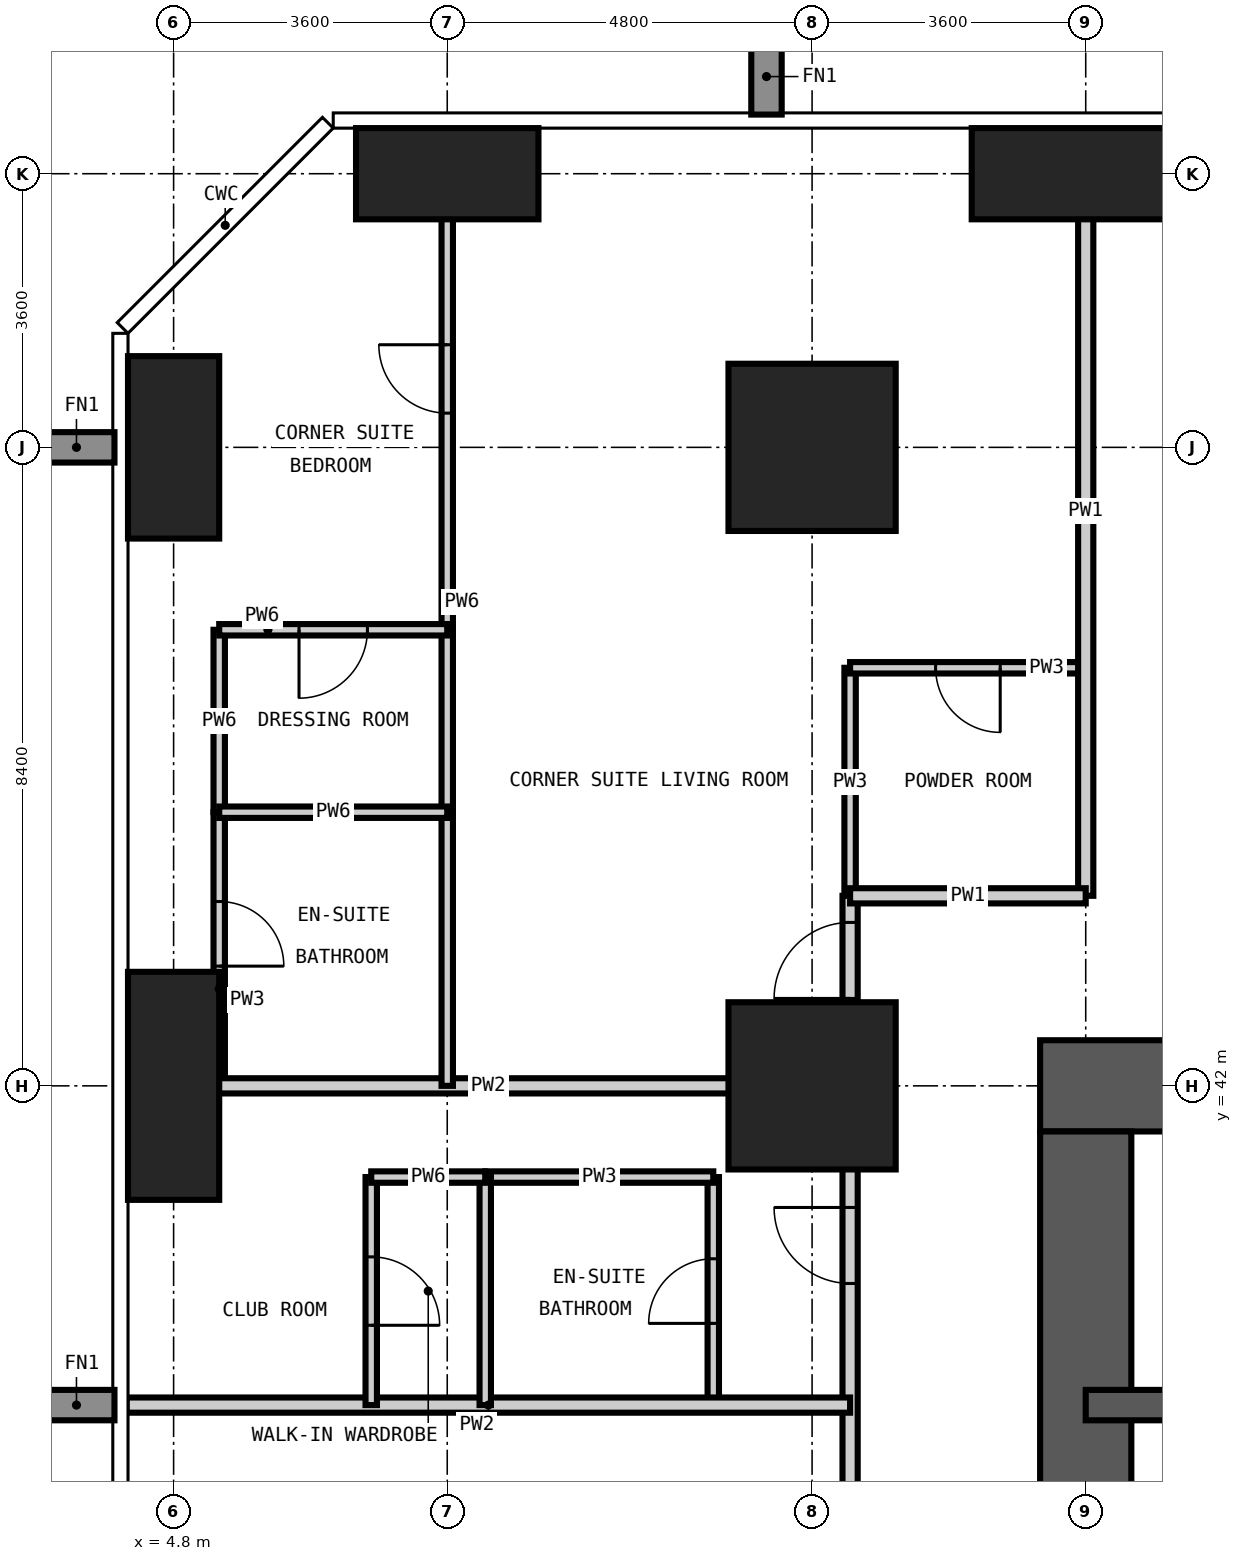
"""IFC4 building model, lengths in metres.
Left out: names, types, materials, properties, quantities, classifications, styles, units other than length and angle.
Written with IfcOpenShell. Run it as: python <this file> out.ifc"""

import sys

from ifc_helpers import new_model, si_unit, direction, frame, frame_2d, origin, origin_2d, place, context, subcontext, project, spatial, rectangle, extrude, element, fill, save


model = new_model("IFC4")
c1 = context("Model", 3, precision=1e-05, world=origin(), true_north=direction((0.0, 1.0)))
c2 = subcontext(c1, "Body", "Model", "MODEL_VIEW")
j1 = project(units=[si_unit("LENGTHUNIT", "METRE"), si_unit("PLANEANGLEUNIT", "RADIAN")], contexts=[c1])
p1 = place(None, origin())
s1 = spatial("IfcSite", under=j1, at=p1, CompositionType="ELEMENT")
p2 = place(p1, origin())
s2 = spatial("IfcBuilding", under=s1, at=p2, CompositionType="ELEMENT")
p3 = place(p2, frame((0.0, 0.0, 162.6)))
s3 = spatial("IfcBuildingStorey", under=s2, at=p3, CompositionType="ELEMENT", Elevation=162.6)
p4 = place(p3, frame((4.8, 42.0, -0.35), z_axis=(0.0, 0.0, 1.0), x_axis=(1.0, 0.0, 0.0)))
e1 = element("IfcColumn", 1, at=p4, inside=s3, PredefinedType="COLUMN", context=c2, shape_type="SweptSolid", body=[
    extrude(rectangle(XDim=1.2, YDim=3.0, at=origin_2d()), origin(), (0.0, 0.0, 1.0), 3.6),
])
p5 = place(p3, frame((4.8, 50.4, -0.35), z_axis=(0.0, 0.0, 1.0), x_axis=(1.0, 0.0, 0.0)))
e2 = element("IfcColumn", 2, at=p5, inside=s3, PredefinedType="COLUMN", context=c2, shape_type="SweptSolid", body=[
    extrude(rectangle(XDim=1.2, YDim=2.4, at=origin_2d()), origin(), (0.0, 0.0, 1.0), 3.6),
])
p6 = place(p3, frame((8.4, 54.0, -0.35), z_axis=(0.0, 0.0, 1.0), x_axis=(1.0, 0.0, 0.0)))
e3 = element("IfcColumn", 3, at=p6, inside=s3, PredefinedType="COLUMN", context=c2, shape_type="SweptSolid", body=[
    extrude(rectangle(XDim=2.4, YDim=1.2, at=origin_2d()), origin(), (0.0, 0.0, 1.0), 3.6),
])
for number, where, z_axis, x_axis in (
    (4, (13.2, 42.0, -0.35), (0.0, 0.0, 1.0), (1.0, 0.0, 0.0)),
    (5, (13.2, 50.4, -0.35), (0.0, 0.0, 1.0), (1.0, 0.0, 0.0)),
):
    element("IfcColumn", number, at=place(p3, frame(where, z_axis=z_axis, x_axis=x_axis)), inside=s3, PredefinedType="COLUMN", context=c2, shape_type="SweptSolid", body=[
        extrude(rectangle(XDim=2.2, YDim=2.2, at=origin_2d()), origin(), (0.0, 0.0, 1.0), 3.6),
    ])
p7 = place(p3, frame((16.8, 54.0, -0.35), z_axis=(0.0, 0.0, 1.0), x_axis=(1.0, 0.0, 0.0)))
e6 = element("IfcColumn", 6, at=p7, inside=s3, PredefinedType="COLUMN", context=c2, shape_type="SweptSolid", body=[
    extrude(rectangle(XDim=3.0, YDim=1.2, at=origin_2d()), origin(), (0.0, 0.0, 1.0), 3.6),
])
p8 = place(p3, frame((42.6, 42.0, -0.35), z_axis=(0.0, 0.0, 1.0), x_axis=(-1.0, 0.0, 0.0)))
e7 = element("IfcWall", 7, at=p8, inside=s3, PredefinedType="SHEAR", context=c2, shape_type="SweptSolid", body=[
    extrude(rectangle(XDim=26.4, YDim=1.2, at=frame_2d((13.2, 0.0))), origin(), (0.0, 0.0, 1.0), 3.6),
])
p9 = place(p8, frame((21.1, 0.0, 0.35)))
e8 = element("IfcOpeningElement", 8, at=p9, cuts=e7, PredefinedType="OPENING", context=c2, shape_type="SweptSolid", body=[
    extrude(rectangle(XDim=1.0, YDim=2.1, at=frame_2d((0.5, 1.05))), frame((0.0, 0.61, 0.0), z_axis=(0.0, -1.0, 0.0), x_axis=(1.0, 0.0, 0.0)), (0.0, 0.0, 1.0), 1.22),
])
p10 = place(p8, frame((10.5, 0.0, 0.35)))
e9 = element("IfcOpeningElement", 9, at=p10, cuts=e7, PredefinedType="OPENING", context=c2, shape_type="SweptSolid", body=[
    extrude(rectangle(XDim=1.2, YDim=2.2, at=frame_2d((0.6, 1.1))), frame((0.0, 0.61, 0.0), z_axis=(0.0, -1.0, 0.0), x_axis=(1.0, 0.0, 0.0)), (0.0, 0.0, 1.0), 1.22),
])
p11 = place(p3, frame((16.8, 41.4, -0.35), z_axis=(0.0, 0.0, 1.0), x_axis=(0.0, -1.0, 0.0)))
e10 = element("IfcWall", 10, at=p11, inside=s3, PredefinedType="SHEAR", context=c2, shape_type="SweptSolid", body=[
    extrude(rectangle(XDim=24.0, YDim=1.2, at=frame_2d((12.0, 0.0))), origin(), (0.0, 0.0, 1.0), 3.6),
])
p12 = place(p11, frame((11.1, 0.0, 0.35)))
e11 = element("IfcOpeningElement", 11, at=p12, cuts=e10, PredefinedType="OPENING", context=c2, shape_type="SweptSolid", body=[
    extrude(rectangle(XDim=1.8, YDim=2.2, at=frame_2d((0.9, 1.1))), frame((0.0, 0.61, 0.0), z_axis=(0.0, -1.0, 0.0), x_axis=(1.0, 0.0, 0.0)), (0.0, 0.0, 1.0), 1.22),
])
p13 = place(p11, frame((19.9, 0.0, 0.35)))
e12 = element("IfcOpeningElement", 12, at=p13, cuts=e10, PredefinedType="OPENING", context=c2, shape_type="SweptSolid", body=[
    extrude(rectangle(XDim=1.0, YDim=2.1, at=frame_2d((0.5, 1.05))), frame((0.0, 0.61, 0.0), z_axis=(0.0, -1.0, 0.0), x_axis=(1.0, 0.0, 0.0)), (0.0, 0.0, 1.0), 1.22),
])
p14 = place(p11, frame((5.2, 0.0, 0.35)))
e13 = element("IfcOpeningElement", 13, at=p14, cuts=e10, PredefinedType="OPENING", context=c2, shape_type="SweptSolid", body=[
    extrude(rectangle(XDim=1.0, YDim=2.1, at=frame_2d((0.5, 1.05))), frame((0.0, 0.61, 0.0), z_axis=(0.0, -1.0, 0.0), x_axis=(1.0, 0.0, 0.0)), (0.0, 0.0, 1.0), 1.22),
])
p15 = place(p3, frame((16.8, 37.8, -0.35), z_axis=(0.0, 0.0, 1.0), x_axis=(1.0, 0.0, 0.0)))
e14 = element("IfcWall", 14, at=p15, inside=s3, PredefinedType="SHEAR", context=c2, shape_type="SweptSolid", body=[
    extrude(rectangle(XDim=8.4, YDim=0.4, at=frame_2d((4.2, 0.0))), origin(), (0.0, 0.0, 1.0), 3.6),
])
p16 = place(p3, frame((5.4, 42.0, 0.0), z_axis=(0.0, 0.0, 1.0), x_axis=(0.0, 1.0, 0.0)))
e15 = element("IfcWall", 15, at=p16, inside=s3, PredefinedType="PARTITIONING", context=c2, shape_type="SweptSolid", body=[
    extrude(rectangle(XDim=3.6, YDim=0.15, at=frame_2d((1.8, 0.0))), origin(), (0.0, 0.0, 1.0), 3.25),
])
p17 = place(p16, frame((1.575, 0.0, 0.0)))
e16 = element("IfcOpeningElement", 16, at=p17, cuts=e15, PredefinedType="OPENING", context=c2, shape_type="SweptSolid", body=[
    extrude(rectangle(XDim=0.85, YDim=2.1, at=frame_2d((0.425, 1.05))), frame((0.0, 0.085, 0.0), z_axis=(0.0, -1.0, 0.0), x_axis=(1.0, 0.0, 0.0)), (0.0, 0.0, 1.0), 0.17),
])
p18 = place(p3, frame((11.9, 37.8, 0.0), z_axis=(0.0, 0.0, 1.0), x_axis=(0.0, 1.0, 0.0)))
e17 = element("IfcWall", 17, at=p18, inside=s3, PredefinedType="PARTITIONING", context=c2, shape_type="SweptSolid", body=[
    extrude(rectangle(XDim=3.0, YDim=0.15, at=frame_2d((1.5, 0.0))), origin(), (0.0, 0.0, 1.0), 3.25),
])
p19 = place(p18, frame((1.075, 0.0, 0.0)))
e18 = element("IfcOpeningElement", 18, at=p19, cuts=e17, PredefinedType="OPENING", context=c2, shape_type="SweptSolid", body=[
    extrude(rectangle(XDim=0.85, YDim=2.1, at=frame_2d((0.425, 1.05))), frame((0.0, 0.085, 0.0), z_axis=(0.0, -1.0, 0.0), x_axis=(1.0, 0.0, 0.0)), (0.0, 0.0, 1.0), 0.17),
])
for number, where, z_axis, x_axis in (
    (19, (13.7, 44.5, 0.0), (0.0, 0.0, 1.0), (0.0, 1.0, 0.0)),
    (20, (8.9, 40.8, 0.0), (0.0, 0.0, 1.0), (1.0, 0.0, 0.0)),
):
    element("IfcWall", number, at=place(p3, frame(where, z_axis=z_axis, x_axis=x_axis)), inside=s3, PredefinedType="PARTITIONING", context=c2, shape_type="SweptSolid", body=[
        extrude(rectangle(XDim=3.0, YDim=0.15, at=frame_2d((1.5, 0.0))), origin(), (0.0, 0.0, 1.0), 3.25),
    ])
p20 = place(p3, frame((13.7, 47.5, 0.0), z_axis=(0.0, 0.0, 1.0), x_axis=(1.0, 0.0, 0.0)))
e21 = element("IfcWall", 21, at=p20, inside=s3, PredefinedType="PARTITIONING", context=c2, shape_type="SweptSolid", body=[
    extrude(rectangle(XDim=3.1, YDim=0.15, at=frame_2d((1.55, 0.0))), origin(), (0.0, 0.0, 1.0), 3.25),
])
p21 = place(p20, frame((1.125, 0.0, 0.0)))
e22 = element("IfcOpeningElement", 22, at=p21, cuts=e21, PredefinedType="OPENING", context=c2, shape_type="SweptSolid", body=[
    extrude(rectangle(XDim=0.85, YDim=2.1, at=frame_2d((0.425, 1.05))), frame((0.0, 0.085, 0.0), z_axis=(0.0, -1.0, 0.0), x_axis=(1.0, 0.0, 0.0)), (0.0, 0.0, 1.0), 0.17),
])
p22 = place(p3, frame((13.7, 13.7, 0.0), z_axis=(0.0, 0.0, 1.0), x_axis=(0.0, 1.0, 0.0)))
e23 = element("IfcWall", 23, at=p22, inside=s3, PredefinedType="PARTITIONING", context=c2, shape_type="SweptSolid", body=[
    extrude(rectangle(XDim=30.8, YDim=0.2, at=frame_2d((15.4, 0.0))), origin(), (0.0, 0.0, 1.0), 3.25),
])
p23 = place(p22, frame((4.7, 0.0, 0.0)))
e24 = element("IfcOpeningElement", 24, at=p23, cuts=e23, PredefinedType="OPENING", context=c2, shape_type="SweptSolid", body=[
    extrude(rectangle(XDim=1.0, YDim=2.2, at=frame_2d((0.5, 1.1))), frame((0.0, 0.11, 0.0), z_axis=(0.0, -1.0, 0.0), x_axis=(1.0, 0.0, 0.0)), (0.0, 0.0, 1.0), 0.22),
])
p24 = place(p22, frame((8.9, 0.0, 0.0)))
e25 = element("IfcOpeningElement", 25, at=p24, cuts=e23, PredefinedType="OPENING", context=c2, shape_type="SweptSolid", body=[
    extrude(rectangle(XDim=1.0, YDim=2.2, at=frame_2d((0.5, 1.1))), frame((0.0, 0.11, 0.0), z_axis=(0.0, -1.0, 0.0), x_axis=(1.0, 0.0, 0.0)), (0.0, 0.0, 1.0), 0.22),
])
p25 = place(p22, frame((13.1, 0.0, 0.0)))
e26 = element("IfcOpeningElement", 26, at=p25, cuts=e23, PredefinedType="OPENING", context=c2, shape_type="SweptSolid", body=[
    extrude(rectangle(XDim=1.0, YDim=2.2, at=frame_2d((0.5, 1.1))), frame((0.0, 0.11, 0.0), z_axis=(0.0, -1.0, 0.0), x_axis=(1.0, 0.0, 0.0)), (0.0, 0.0, 1.0), 0.22),
])
p26 = place(p22, frame((17.3, 0.0, 0.0)))
e27 = element("IfcOpeningElement", 27, at=p26, cuts=e23, PredefinedType="OPENING", context=c2, shape_type="SweptSolid", body=[
    extrude(rectangle(XDim=1.0, YDim=2.2, at=frame_2d((0.5, 1.1))), frame((0.0, 0.11, 0.0), z_axis=(0.0, -1.0, 0.0), x_axis=(1.0, 0.0, 0.0)), (0.0, 0.0, 1.0), 0.22),
])
p27 = place(p22, frame((21.5, 0.0, 0.0)))
e28 = element("IfcOpeningElement", 28, at=p27, cuts=e23, PredefinedType="OPENING", context=c2, shape_type="SweptSolid", body=[
    extrude(rectangle(XDim=1.0, YDim=2.2, at=frame_2d((0.5, 1.1))), frame((0.0, 0.11, 0.0), z_axis=(0.0, -1.0, 0.0), x_axis=(1.0, 0.0, 0.0)), (0.0, 0.0, 1.0), 0.22),
])
p28 = place(p22, frame((25.7, 0.0, 0.0)))
e29 = element("IfcOpeningElement", 29, at=p28, cuts=e23, PredefinedType="OPENING", context=c2, shape_type="SweptSolid", body=[
    extrude(rectangle(XDim=1.0, YDim=2.2, at=frame_2d((0.5, 1.1))), frame((0.0, 0.11, 0.0), z_axis=(0.0, -1.0, 0.0), x_axis=(1.0, 0.0, 0.0)), (0.0, 0.0, 1.0), 0.22),
])
p29 = place(p22, frame((0.95, 0.0, 0.0)))
e30 = element("IfcOpeningElement", 30, at=p29, cuts=e23, PredefinedType="OPENING", context=c2, shape_type="SweptSolid", body=[
    extrude(rectangle(XDim=1.0, YDim=2.2, at=frame_2d((0.5, 1.1))), frame((0.0, 0.11, 0.0), z_axis=(0.0, -1.0, 0.0), x_axis=(1.0, 0.0, 0.0)), (0.0, 0.0, 1.0), 0.22),
])
p30 = place(p22, frame((29.45, 0.0, 0.0)))
e31 = element("IfcOpeningElement", 31, at=p30, cuts=e23, PredefinedType="OPENING", context=c2, shape_type="SweptSolid", body=[
    extrude(rectangle(XDim=1.0, YDim=2.2, at=frame_2d((0.5, 1.1))), frame((0.0, 0.11, 0.0), z_axis=(0.0, -1.0, 0.0), x_axis=(1.0, 0.0, 0.0)), (0.0, 0.0, 1.0), 0.22),
])
p31 = place(p3, frame((16.8, 44.5, 0.0), z_axis=(0.0, 0.0, 1.0), x_axis=(0.0, 1.0, 0.0)))
e32 = element("IfcWall", 32, at=p31, inside=s3, PredefinedType="PARTITIONING", context=c2, shape_type="SweptSolid", body=[
    extrude(rectangle(XDim=10.118, YDim=0.2, at=frame_2d((5.059, 0.0))), origin(), (0.0, 0.0, 1.0), 3.25),
])
p32 = place(p3, frame((13.7, 44.5, 0.0), z_axis=(0.0, 0.0, 1.0), x_axis=(1.0, 0.0, 0.0)))
e33 = element("IfcWall", 33, at=p32, inside=s3, PredefinedType="PARTITIONING", context=c2, shape_type="SweptSolid", body=[
    extrude(rectangle(XDim=3.1, YDim=0.2, at=frame_2d((1.55, 0.0))), origin(), (0.0, 0.0, 1.0), 3.25),
])
for number, where, z_axis, x_axis in (
    (34, (4.182, 37.8, 0.0), (0.0, 0.0, 1.0), (1.0, 0.0, 0.0)),
    (35, (4.182, 42.0, 0.0), (0.0, 0.0, 1.0), (1.0, 0.0, 0.0)),
):
    element("IfcWall", number, at=place(p3, frame(where, z_axis=z_axis, x_axis=x_axis)), inside=s3, PredefinedType="PARTITIONING", context=c2, shape_type="SweptSolid", body=[
        extrude(rectangle(XDim=9.518, YDim=0.2, at=frame_2d((4.759, 0.0))), origin(), (0.0, 0.0, 1.0), 3.25),
    ])
p33 = place(p3, frame((5.4, 45.6, 0.0), z_axis=(0.0, 0.0, 1.0), x_axis=(0.0, 1.0, 0.0)))
e36 = element("IfcWall", 36, at=p33, inside=s3, PredefinedType="PARTITIONING", context=c2, shape_type="SweptSolid", body=[
    extrude(rectangle(XDim=2.4, YDim=0.15, at=frame_2d((1.2, 0.0))), origin(), (0.0, 0.0, 1.0), 3.25),
])
p34 = place(p3, frame((7.4, 37.8, 0.0), z_axis=(0.0, 0.0, 1.0), x_axis=(0.0, 1.0, 0.0)))
e37 = element("IfcWall", 37, at=p34, inside=s3, PredefinedType="PARTITIONING", context=c2, shape_type="SweptSolid", body=[
    extrude(rectangle(XDim=3.0, YDim=0.15, at=frame_2d((1.5, 0.0))), origin(), (0.0, 0.0, 1.0), 3.25),
])
p35 = place(p34, frame((1.05, 0.0, 0.0)))
e38 = element("IfcOpeningElement", 38, at=p35, cuts=e37, PredefinedType="OPENING", context=c2, shape_type="SweptSolid", body=[
    extrude(rectangle(XDim=0.9, YDim=2.1, at=frame_2d((0.45, 1.05))), frame((0.0, 0.085, 0.0), z_axis=(0.0, -1.0, 0.0), x_axis=(1.0, 0.0, 0.0)), (0.0, 0.0, 1.0), 0.17),
])
p36 = place(p3, frame((8.4, 42.0, 0.0), z_axis=(0.0, 0.0, 1.0), x_axis=(0.0, 1.0, 0.0)))
e39 = element("IfcWall", 39, at=p36, inside=s3, PredefinedType="PARTITIONING", context=c2, shape_type="SweptSolid", body=[
    extrude(rectangle(XDim=12.618, YDim=0.15, at=frame_2d((6.309, 0.0))), origin(), (0.0, 0.0, 1.0), 3.25),
])
p37 = place(p36, frame((8.85, 0.0, 0.0)))
e40 = element("IfcOpeningElement", 40, at=p37, cuts=e39, PredefinedType="OPENING", context=c2, shape_type="SweptSolid", body=[
    extrude(rectangle(XDim=0.9, YDim=2.1, at=frame_2d((0.45, 1.05))), frame((0.0, 0.085, 0.0), z_axis=(0.0, -1.0, 0.0), x_axis=(1.0, 0.0, 0.0)), (0.0, 0.0, 1.0), 0.17),
])
p38 = place(p3, frame((8.9, 37.8, 0.0), z_axis=(0.0, 0.0, 1.0), x_axis=(0.0, 1.0, 0.0)))
e41 = element("IfcWall", 41, at=p38, inside=s3, PredefinedType="PARTITIONING", context=c2, shape_type="SweptSolid", body=[
    extrude(rectangle(XDim=3.0, YDim=0.15, at=frame_2d((1.5, 0.0))), origin(), (0.0, 0.0, 1.0), 3.25),
])
p39 = place(p3, frame((7.4, 40.8, 0.0), z_axis=(0.0, 0.0, 1.0), x_axis=(1.0, 0.0, 0.0)))
e42 = element("IfcWall", 42, at=p39, inside=s3, PredefinedType="PARTITIONING", context=c2, shape_type="SweptSolid", body=[
    extrude(rectangle(XDim=1.5, YDim=0.15, at=frame_2d((0.75, 0.0))), origin(), (0.0, 0.0, 1.0), 3.25),
])
p40 = place(p3, frame((5.4, 45.6, 0.0), z_axis=(0.0, 0.0, 1.0), x_axis=(1.0, 0.0, 0.0)))
e43 = element("IfcWall", 43, at=p40, inside=s3, PredefinedType="PARTITIONING", context=c2, shape_type="SweptSolid", body=[
    extrude(rectangle(XDim=3.0, YDim=0.15, at=frame_2d((1.5, 0.0))), origin(), (0.0, 0.0, 1.0), 3.25),
])
p41 = place(p3, frame((5.4, 48.0, 0.0), z_axis=(0.0, 0.0, 1.0), x_axis=(1.0, 0.0, 0.0)))
e44 = element("IfcWall", 44, at=p41, inside=s3, PredefinedType="PARTITIONING", context=c2, shape_type="SweptSolid", body=[
    extrude(rectangle(XDim=3.0, YDim=0.15, at=frame_2d((1.5, 0.0))), origin(), (0.0, 0.0, 1.0), 3.25),
])
p42 = place(p41, frame((1.05, 0.0, 0.0)))
e45 = element("IfcOpeningElement", 45, at=p42, cuts=e44, PredefinedType="OPENING", context=c2, shape_type="SweptSolid", body=[
    extrude(rectangle(XDim=0.9, YDim=2.1, at=frame_2d((0.45, 1.05))), frame((0.0, 0.085, 0.0), z_axis=(0.0, -1.0, 0.0), x_axis=(1.0, 0.0, 0.0)), (0.0, 0.0, 1.0), 0.17),
])
p43 = place(p28, origin())
e46 = element("IfcDoor", 46, at=p43, inside=s3, OperationType="SINGLE_SWING_RIGHT", PredefinedType="DOOR", context=c2, shape_type="SweptSolid", body=[
    extrude(rectangle(XDim=1.0, YDim=2.2, at=frame_2d((0.5, 1.1))), frame((0.0, 0.025, 0.0), z_axis=(0.0, -1.0, 0.0), x_axis=(1.0, 0.0, 0.0)), (0.0, 0.0, 1.0), 0.05),
])
fill(e29, e46)
p44 = place(p19, origin())
e47 = element("IfcDoor", 47, at=p44, inside=s3, OperationType="SINGLE_SWING_LEFT", PredefinedType="DOOR", context=c2, shape_type="SweptSolid", body=[
    extrude(rectangle(XDim=0.85, YDim=2.1, at=frame_2d((0.425, 1.05))), frame((0.0, 0.025, 0.0), z_axis=(0.0, -1.0, 0.0), x_axis=(1.0, 0.0, 0.0)), (0.0, 0.0, 1.0), 0.05),
])
fill(e18, e47)
p45 = place(p35, frame((0.9, 0.0, 0.0), z_axis=(0.0, 0.0, 1.0), x_axis=(-1.0, 0.0, 0.0)))
e48 = element("IfcDoor", 48, at=p45, inside=s3, OperationType="SINGLE_SWING_RIGHT", PredefinedType="DOOR", context=c2, shape_type="SweptSolid", body=[
    extrude(rectangle(XDim=0.9, YDim=2.1, at=frame_2d((0.45, 1.05))), frame((0.0, 0.025, 0.0), z_axis=(0.0, -1.0, 0.0), x_axis=(1.0, 0.0, 0.0)), (0.0, 0.0, 1.0), 0.05),
])
fill(e38, e48)
p46 = place(p30, origin())
e49 = element("IfcDoor", 49, at=p46, inside=s3, OperationType="SINGLE_SWING_LEFT", PredefinedType="DOOR", context=c2, shape_type="SweptSolid", body=[
    extrude(rectangle(XDim=1.0, YDim=2.2, at=frame_2d((0.5, 1.1))), frame((0.0, 0.025, 0.0), z_axis=(0.0, -1.0, 0.0), x_axis=(1.0, 0.0, 0.0)), (0.0, 0.0, 1.0), 0.05),
])
fill(e31, e49)
p47 = place(p21, frame((0.85, 0.0, 0.0), z_axis=(0.0, 0.0, 1.0), x_axis=(-1.0, 0.0, 0.0)))
e50 = element("IfcDoor", 50, at=p47, inside=s3, OperationType="SINGLE_SWING_LEFT", PredefinedType="DOOR", context=c2, shape_type="SweptSolid", body=[
    extrude(rectangle(XDim=0.85, YDim=2.1, at=frame_2d((0.425, 1.05))), frame((0.0, 0.025, 0.0), z_axis=(0.0, -1.0, 0.0), x_axis=(1.0, 0.0, 0.0)), (0.0, 0.0, 1.0), 0.05),
])
fill(e22, e50)
p48 = place(p37, origin())
e51 = element("IfcDoor", 51, at=p48, inside=s3, OperationType="SINGLE_SWING_RIGHT", PredefinedType="DOOR", context=c2, shape_type="SweptSolid", body=[
    extrude(rectangle(XDim=0.9, YDim=2.1, at=frame_2d((0.45, 1.05))), frame((0.0, 0.025, 0.0), z_axis=(0.0, -1.0, 0.0), x_axis=(1.0, 0.0, 0.0)), (0.0, 0.0, 1.0), 0.05),
])
fill(e40, e51)
p49 = place(p17, frame((0.85, 0.0, 0.0), z_axis=(0.0, 0.0, 1.0), x_axis=(-1.0, 0.0, 0.0)))
e52 = element("IfcDoor", 52, at=p49, inside=s3, OperationType="SINGLE_SWING_RIGHT", PredefinedType="DOOR", context=c2, shape_type="SweptSolid", body=[
    extrude(rectangle(XDim=0.85, YDim=2.1, at=frame_2d((0.425, 1.05))), frame((0.0, 0.025, 0.0), z_axis=(0.0, -1.0, 0.0), x_axis=(1.0, 0.0, 0.0)), (0.0, 0.0, 1.0), 0.05),
])
fill(e16, e52)
p50 = place(p42, frame((0.9, 0.0, 0.0), z_axis=(0.0, 0.0, 1.0), x_axis=(-1.0, 0.0, 0.0)))
e53 = element("IfcDoor", 53, at=p50, inside=s3, OperationType="SINGLE_SWING_RIGHT", PredefinedType="DOOR", context=c2, shape_type="SweptSolid", body=[
    extrude(rectangle(XDim=0.9, YDim=2.1, at=frame_2d((0.45, 1.05))), frame((0.0, 0.025, 0.0), z_axis=(0.0, -1.0, 0.0), x_axis=(1.0, 0.0, 0.0)), (0.0, 0.0, 1.0), 0.05),
])
fill(e45, e53)
save(model, sys.argv[1])
